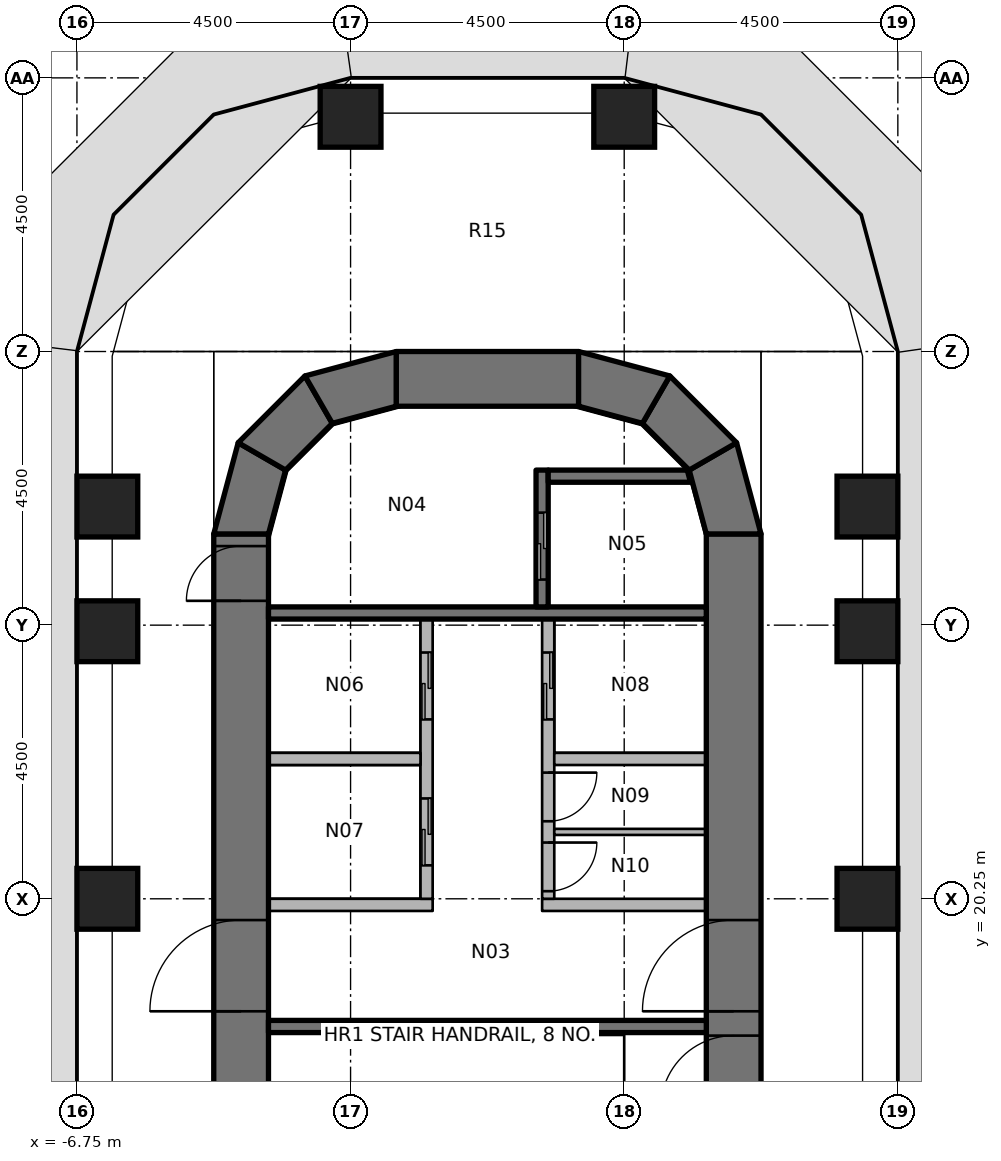
"""IFC4 building model, lengths in metres.
Left out: names, types, materials, properties, quantities, classifications, styles, units other than length and angle.
Written with IfcOpenShell. Run it as: python <this file> out.ifc"""

import sys

from ifc_helpers import new_model, si_unit, direction, frame, frame_2d, origin, origin_2d, place, context, subcontext, project, spatial, polyline, rectangle, outline, extrude, element, fill, save


model = new_model("IFC4")
c1 = context("Model", 3, precision=1e-05, world=origin(), true_north=direction((0.0, 1.0)))
c2 = subcontext(c1, "Body", "Model", "MODEL_VIEW")
j1 = project(units=[si_unit("LENGTHUNIT", "METRE"), si_unit("PLANEANGLEUNIT", "RADIAN")], contexts=[c1])
p1 = place(None, origin())
s1 = spatial("IfcSite", under=j1, at=p1, CompositionType="ELEMENT")
p2 = place(p1, origin())
s2 = spatial("IfcBuilding", under=s1, at=p2, CompositionType="ELEMENT")
p3 = place(p2, frame((0.0, 0.0, 43.8)))
s3 = spatial("IfcBuildingStorey", under=s2, at=p3, CompositionType="ELEMENT", Elevation=43.8)
for number, where, z_axis, x_axis in (
    (1, (-6.25, 20.25, 0.0), (0.0, 0.0, 1.0), (1.0, 0.0, 0.0)),
    (2, (-6.25, 24.65, 0.0), (0.0, 0.0, 1.0), (1.0, 0.0, 0.0)),
    (3, (-6.25, 26.7, 0.0), (0.0, 0.0, 1.0), (1.0, 0.0, 0.0)),
    (4, (-2.25, 33.11, 0.0), (0.0, 0.0, 1.0), (1.0, 0.0, 0.0)),
    (5, (2.25, 33.11, 0.0), (0.0, 0.0, 1.0), (1.0, 0.0, 0.0)),
    (6, (6.25, 20.25, 0.0), (0.0, 0.0, 1.0), (1.0, 0.0, 0.0)),
    (7, (6.25, 24.65, 0.0), (0.0, 0.0, 1.0), (1.0, 0.0, 0.0)),
    (8, (6.25, 26.7, 0.0), (0.0, 0.0, 1.0), (1.0, 0.0, 0.0)),
):
    element("IfcColumn", number, at=place(p3, frame(where, z_axis=z_axis, x_axis=x_axis)), inside=s3, PredefinedType="COLUMN", context=c2, shape_type="SweptSolid", body=[
        extrude(rectangle(XDim=1.0, YDim=1.0, at=origin_2d()), origin(), (0.0, 0.0, 1.0), 4.05),
    ])
p4 = place(p3, frame((-4.05, 11.25, 0.0), z_axis=(0.0, 0.0, 1.0), x_axis=(0.0, 1.0, 0.0)))
e9 = element("IfcWall", 9, at=p4, inside=s3, PredefinedType="SHEAR", context=c2, shape_type="SweptSolid", body=[
    extrude(rectangle(XDim=15.0, YDim=0.9, at=frame_2d((7.5, 0.0))), origin(), (0.0, 0.0, 1.0), 4.2),
])
p5 = place(p4, frame((7.15, 0.0, 0.0)))
e10 = element("IfcOpeningElement", 10, at=p5, cuts=e9, PredefinedType="OPENING", context=c2, shape_type="SweptSolid", body=[
    extrude(rectangle(XDim=1.5, YDim=2.3, at=frame_2d((0.75, 1.15))), frame((0.0, 0.46, 0.0), z_axis=(0.0, -1.0, 0.0), x_axis=(1.0, 0.0, 0.0)), (0.0, 0.0, 1.0), 0.92),
])
p6 = place(p4, frame((13.9, 0.0, 0.0)))
e11 = element("IfcOpeningElement", 11, at=p6, cuts=e9, PredefinedType="OPENING", context=c2, shape_type="SweptSolid", body=[
    extrude(rectangle(XDim=0.9, YDim=2.1, at=frame_2d((0.45, 1.05))), frame((0.0, 0.46, 0.0), z_axis=(0.0, -1.0, 0.0), x_axis=(1.0, 0.0, 0.0)), (0.0, 0.0, 1.0), 0.92),
])
p7 = place(p4, frame((1.15, 0.0, 0.0)))
e12 = element("IfcOpeningElement", 12, at=p7, cuts=e9, PredefinedType="OPENING", context=c2, shape_type="SweptSolid", body=[
    extrude(rectangle(XDim=1.2, YDim=2.1, at=frame_2d((0.6, 1.05))), frame((0.0, 0.46, 0.0), z_axis=(0.0, -1.0, 0.0), x_axis=(1.0, 0.0, 0.0)), (0.0, 0.0, 1.0), 0.92),
])
p8 = place(p3, frame((4.05, 11.25, 0.0), z_axis=(0.0, 0.0, 1.0), x_axis=(0.0, 1.0, 0.0)))
e13 = element("IfcWall", 13, at=p8, inside=s3, PredefinedType="SHEAR", context=c2, shape_type="SweptSolid", body=[
    extrude(rectangle(XDim=15.0, YDim=0.9, at=frame_2d((7.5, 0.0))), origin(), (0.0, 0.0, 1.0), 4.2),
])
p9 = place(p8, frame((7.15, 0.0, 0.0)))
e14 = element("IfcOpeningElement", 14, at=p9, cuts=e13, PredefinedType="OPENING", context=c2, shape_type="SweptSolid", body=[
    extrude(rectangle(XDim=1.5, YDim=2.3, at=frame_2d((0.75, 1.15))), frame((0.0, 0.46, 0.0), z_axis=(0.0, -1.0, 0.0), x_axis=(1.0, 0.0, 0.0)), (0.0, 0.0, 1.0), 0.92),
])
p10 = place(p8, frame((5.55, 0.0, 0.0)))
e15 = element("IfcOpeningElement", 15, at=p10, cuts=e13, PredefinedType="OPENING", context=c2, shape_type="SweptSolid", body=[
    extrude(rectangle(XDim=1.2, YDim=2.1, at=frame_2d((0.6, 1.05))), frame((0.0, 0.46, 0.0), z_axis=(0.0, -1.0, 0.0), x_axis=(1.0, 0.0, 0.0)), (0.0, 0.0, 1.0), 0.92),
])
p11 = place(p3, frame((-1.5, 28.8, 0.0), z_axis=(0.0, 0.0, 1.0), x_axis=(1.0, 0.0, 0.0)))
e16 = element("IfcWall", 16, at=p11, inside=s3, PredefinedType="SHEAR", context=c2, shape_type="SweptSolid", body=[
    extrude(rectangle(XDim=3.0, YDim=0.9, at=frame_2d((1.5, 0.0))), origin(), (0.0, 0.0, 1.0), 4.2),
])
p12 = place(p3, origin())
e17 = element("IfcWall", 17, at=p12, inside=s3, PredefinedType="SHEAR", context=c2, shape_type="SweptSolid", body=[
    extrude(outline(polyline([(-4.5, 26.25), (-4.098, 27.75), (-3.319, 27.3), (-3.6, 26.25), (-4.5, 26.25)])), origin(), (0.0, 0.0, 1.0), 4.2),
])
p13 = place(p3, origin())
e18 = element("IfcWall", 18, at=p13, inside=s3, PredefinedType="SHEAR", context=c2, shape_type="SweptSolid", body=[
    extrude(outline(polyline([(-4.098, 27.75), (-3.0, 28.848), (-2.55, 28.069), (-3.319, 27.3), (-4.098, 27.75)])), origin(), (0.0, 0.0, 1.0), 4.2),
])
p14 = place(p3, origin())
e19 = element("IfcWall", 19, at=p14, inside=s3, PredefinedType="SHEAR", context=c2, shape_type="SweptSolid", body=[
    extrude(outline(polyline([(-3.0, 28.848), (-1.5, 29.25), (-1.5, 28.35), (-2.55, 28.069), (-3.0, 28.848)])), origin(), (0.0, 0.0, 1.0), 4.2),
])
p15 = place(p3, origin())
e20 = element("IfcWall", 20, at=p15, inside=s3, PredefinedType="SHEAR", context=c2, shape_type="SweptSolid", body=[
    extrude(outline(polyline([(4.5, 26.25), (4.098, 27.75), (3.319, 27.3), (3.6, 26.25), (4.5, 26.25)])), origin(), (0.0, 0.0, 1.0), 4.2),
])
p16 = place(p3, origin())
e21 = element("IfcWall", 21, at=p16, inside=s3, PredefinedType="SHEAR", context=c2, shape_type="SweptSolid", body=[
    extrude(outline(polyline([(4.098, 27.75), (3.0, 28.848), (2.55, 28.069), (3.319, 27.3), (4.098, 27.75)])), origin(), (0.0, 0.0, 1.0), 4.2),
])
p17 = place(p3, origin())
e22 = element("IfcWall", 22, at=p17, inside=s3, PredefinedType="SHEAR", context=c2, shape_type="SweptSolid", body=[
    extrude(outline(polyline([(3.0, 28.848), (1.5, 29.25), (1.5, 28.35), (2.55, 28.069), (3.0, 28.848)])), origin(), (0.0, 0.0, 1.0), 4.2),
])
p18 = place(p3, frame((-3.6, 24.95, 0.0), z_axis=(0.0, 0.0, 1.0), x_axis=(1.0, 0.0, 0.0)))
e23 = element("IfcWall", 23, at=p18, inside=s3, PredefinedType="SHEAR", context=c2, shape_type="SweptSolid", body=[
    extrude(rectangle(XDim=7.2, YDim=0.2, at=frame_2d((3.6, 0.0))), origin(), (0.0, 0.0, 1.0), 4.05),
])
p19 = place(p3, frame((0.9, 27.3, 0.0), z_axis=(0.0, 0.0, 1.0), x_axis=(0.0, -1.0, 0.0)))
e24 = element("IfcWall", 24, at=p19, inside=s3, PredefinedType="SHEAR", context=c2, shape_type="SweptSolid", body=[
    extrude(rectangle(XDim=2.25, YDim=0.2, at=frame_2d((1.125, 0.0))), origin(), (0.0, 0.0, 1.0), 4.05),
])
p20 = place(p19, frame((0.7, 0.0, 0.0)))
e25 = element("IfcOpeningElement", 25, at=p20, cuts=e24, PredefinedType="OPENING", context=c2, shape_type="SweptSolid", body=[
    extrude(rectangle(XDim=1.1, YDim=2.3, at=frame_2d((0.55, 1.15))), frame((0.0, 0.11, 0.0), z_axis=(0.0, -1.0, 0.0), x_axis=(1.0, 0.0, 0.0)), (0.0, 0.0, 1.0), 0.22),
])
p21 = place(p3, origin())
e26 = element("IfcWall", 26, at=p21, inside=s3, PredefinedType="SHEAR", context=c2, shape_type="SweptSolid", body=[
    extrude(outline(polyline([(1.0, 27.1), (3.341, 27.1), (3.291, 27.284), (3.275, 27.3), (1.0, 27.3), (1.0, 27.1)])), origin(), (0.0, 0.0, 1.0), 4.05),
])
p22 = place(p3, frame((-3.6, 18.15, 0.0), z_axis=(0.0, 0.0, 1.0), x_axis=(1.0, 0.0, 0.0)))
e27 = element("IfcWall", 27, at=p22, inside=s3, PredefinedType="SHEAR", context=c2, shape_type="SweptSolid", body=[
    extrude(rectangle(XDim=7.2, YDim=0.2, at=frame_2d((3.6, 0.0))), origin(), (0.0, 0.0, 1.0), 4.05),
])
p23 = place(p3, frame((-3.6, 20.15, 0.0), z_axis=(0.0, 0.0, 1.0), x_axis=(1.0, 0.0, 0.0)))
e28 = element("IfcWall", 28, at=p23, inside=s3, PredefinedType="PARTITIONING", context=c2, shape_type="SweptSolid", body=[
    extrude(rectangle(XDim=2.7, YDim=0.2, at=frame_2d((1.35, 0.0))), origin(), (0.0, 0.0, 1.0), 4.05),
])
p24 = place(p3, frame((-1.0, 24.85, 0.0), z_axis=(0.0, 0.0, 1.0), x_axis=(0.0, -1.0, 0.0)))
e29 = element("IfcWall", 29, at=p24, inside=s3, PredefinedType="PARTITIONING", context=c2, shape_type="SweptSolid", body=[
    extrude(rectangle(XDim=4.6, YDim=0.2, at=frame_2d((2.3, 0.0))), origin(), (0.0, 0.0, 1.0), 4.05),
])
p25 = place(p24, frame((0.55, 0.0, 0.0)))
e30 = element("IfcOpeningElement", 30, at=p25, cuts=e29, PredefinedType="OPENING", context=c2, shape_type="SweptSolid", body=[
    extrude(rectangle(XDim=1.1, YDim=2.3, at=frame_2d((0.55, 1.15))), frame((0.0, 0.11, 0.0), z_axis=(0.0, -1.0, 0.0), x_axis=(1.0, 0.0, 0.0)), (0.0, 0.0, 1.0), 0.22),
])
p26 = place(p24, frame((2.95, 0.0, 0.0)))
e31 = element("IfcOpeningElement", 31, at=p26, cuts=e29, PredefinedType="OPENING", context=c2, shape_type="SweptSolid", body=[
    extrude(rectangle(XDim=1.1, YDim=2.3, at=frame_2d((0.55, 1.15))), frame((0.0, 0.11, 0.0), z_axis=(0.0, -1.0, 0.0), x_axis=(1.0, 0.0, 0.0)), (0.0, 0.0, 1.0), 0.22),
])
p27 = place(p3, frame((0.9, 20.15, 0.0), z_axis=(0.0, 0.0, 1.0), x_axis=(1.0, 0.0, 0.0)))
e32 = element("IfcWall", 32, at=p27, inside=s3, PredefinedType="PARTITIONING", context=c2, shape_type="SweptSolid", body=[
    extrude(rectangle(XDim=2.7, YDim=0.2, at=frame_2d((1.35, 0.0))), origin(), (0.0, 0.0, 1.0), 4.05),
])
p28 = place(p3, frame((1.0, 24.85, 0.0), z_axis=(0.0, 0.0, 1.0), x_axis=(0.0, -1.0, 0.0)))
e33 = element("IfcWall", 33, at=p28, inside=s3, PredefinedType="PARTITIONING", context=c2, shape_type="SweptSolid", body=[
    extrude(rectangle(XDim=4.6, YDim=0.2, at=frame_2d((2.3, 0.0))), origin(), (0.0, 0.0, 1.0), 4.05),
])
p29 = place(p28, frame((0.55, 0.0, 0.0)))
e34 = element("IfcOpeningElement", 34, at=p29, cuts=e33, PredefinedType="OPENING", context=c2, shape_type="SweptSolid", body=[
    extrude(rectangle(XDim=1.1, YDim=2.3, at=frame_2d((0.55, 1.15))), frame((0.0, 0.11, 0.0), z_axis=(0.0, -1.0, 0.0), x_axis=(1.0, 0.0, 0.0)), (0.0, 0.0, 1.0), 0.22),
])
p30 = place(p28, frame((2.525, 0.0, 0.0)))
e35 = element("IfcOpeningElement", 35, at=p30, cuts=e33, PredefinedType="OPENING", context=c2, shape_type="SweptSolid", body=[
    extrude(rectangle(XDim=0.8, YDim=2.1, at=frame_2d((0.4, 1.05))), frame((0.0, 0.11, 0.0), z_axis=(0.0, -1.0, 0.0), x_axis=(1.0, 0.0, 0.0)), (0.0, 0.0, 1.0), 0.22),
])
p31 = place(p28, frame((3.675, 0.0, 0.0)))
e36 = element("IfcOpeningElement", 36, at=p31, cuts=e33, PredefinedType="OPENING", context=c2, shape_type="SweptSolid", body=[
    extrude(rectangle(XDim=0.8, YDim=2.1, at=frame_2d((0.4, 1.05))), frame((0.0, 0.11, 0.0), z_axis=(0.0, -1.0, 0.0), x_axis=(1.0, 0.0, 0.0)), (0.0, 0.0, 1.0), 0.22),
])
for number, where, z_axis, x_axis in (
    (37, (-3.6, 22.55, 0.0), (0.0, 0.0, 1.0), (1.0, 0.0, 0.0)),
    (38, (1.1, 22.55, 0.0), (0.0, 0.0, 1.0), (1.0, 0.0, 0.0)),
):
    element("IfcWall", number, at=place(p3, frame(where, z_axis=z_axis, x_axis=x_axis)), inside=s3, PredefinedType="PARTITIONING", context=c2, shape_type="SweptSolid", body=[
        extrude(rectangle(XDim=2.5, YDim=0.2, at=frame_2d((1.25, 0.0))), origin(), (0.0, 0.0, 1.0), 4.05),
    ])
p32 = place(p3, frame((1.1, 21.35, 0.0), z_axis=(0.0, 0.0, 1.0), x_axis=(1.0, 0.0, 0.0)))
e39 = element("IfcWall", 39, at=p32, inside=s3, PredefinedType="PARTITIONING", context=c2, shape_type="SweptSolid", body=[
    extrude(rectangle(XDim=2.5, YDim=0.1, at=frame_2d((1.25, 0.0))), origin(), (0.0, 0.0, 1.0), 4.05),
])
p33 = place(p5, origin())
e40 = element("IfcDoor", 40, at=p33, inside=s3, OperationType="DOUBLE_DOOR_SINGLE_SWING", PredefinedType="DOOR", context=c2, shape_type="SweptSolid", body=[
    extrude(rectangle(XDim=1.5, YDim=2.3, at=frame_2d((0.75, 1.15))), frame((0.0, 0.025, 0.0), z_axis=(0.0, -1.0, 0.0), x_axis=(1.0, 0.0, 0.0)), (0.0, 0.0, 1.0), 0.05),
])
fill(e10, e40)
p34 = place(p9, origin())
e41 = element("IfcDoor", 41, at=p34, inside=s3, OperationType="DOUBLE_DOOR_SINGLE_SWING", PredefinedType="DOOR", context=c2, shape_type="SweptSolid", body=[
    extrude(rectangle(XDim=1.5, YDim=2.3, at=frame_2d((0.75, 1.15))), frame((0.0, 0.025, 0.0), z_axis=(0.0, -1.0, 0.0), x_axis=(1.0, 0.0, 0.0)), (0.0, 0.0, 1.0), 0.05),
])
fill(e14, e41)
p35 = place(p6, origin())
e42 = element("IfcDoor", 42, at=p35, inside=s3, OperationType="SINGLE_SWING_LEFT", PredefinedType="DOOR", context=c2, shape_type="SweptSolid", body=[
    extrude(rectangle(XDim=0.9, YDim=2.1, at=frame_2d((0.45, 1.05))), frame((0.0, 0.025, 0.0), z_axis=(0.0, -1.0, 0.0), x_axis=(1.0, 0.0, 0.0)), (0.0, 0.0, 1.0), 0.05),
])
fill(e11, e42)
p36 = place(p10, origin())
e43 = element("IfcDoor", 43, at=p36, inside=s3, OperationType="SINGLE_SWING_RIGHT", PredefinedType="DOOR", context=c2, shape_type="SweptSolid", body=[
    extrude(rectangle(XDim=1.2, YDim=2.1, at=frame_2d((0.6, 1.05))), frame((0.0, 0.025, 0.0), z_axis=(0.0, -1.0, 0.0), x_axis=(1.0, 0.0, 0.0)), (0.0, 0.0, 1.0), 0.05),
])
fill(e15, e43)
p37 = place(p20, origin())
e44 = element("IfcDoor", 44, at=p37, inside=s3, OperationType="DOUBLE_DOOR_SLIDING", PredefinedType="DOOR", context=c2, shape_type="SweptSolid", body=[
    extrude(rectangle(XDim=1.1, YDim=2.3, at=frame_2d((0.55, 1.15))), frame((0.0, 0.025, 0.0), z_axis=(0.0, -1.0, 0.0), x_axis=(1.0, 0.0, 0.0)), (0.0, 0.0, 1.0), 0.05),
])
fill(e25, e44)
p38 = place(p25, origin())
e45 = element("IfcDoor", 45, at=p38, inside=s3, OperationType="DOUBLE_DOOR_SLIDING", PredefinedType="DOOR", context=c2, shape_type="SweptSolid", body=[
    extrude(rectangle(XDim=1.1, YDim=2.3, at=frame_2d((0.55, 1.15))), frame((0.0, 0.025, 0.0), z_axis=(0.0, -1.0, 0.0), x_axis=(1.0, 0.0, 0.0)), (0.0, 0.0, 1.0), 0.05),
])
fill(e30, e45)
p39 = place(p26, origin())
e46 = element("IfcDoor", 46, at=p39, inside=s3, OperationType="DOUBLE_DOOR_SLIDING", PredefinedType="DOOR", context=c2, shape_type="SweptSolid", body=[
    extrude(rectangle(XDim=1.1, YDim=2.3, at=frame_2d((0.55, 1.15))), frame((0.0, 0.025, 0.0), z_axis=(0.0, -1.0, 0.0), x_axis=(1.0, 0.0, 0.0)), (0.0, 0.0, 1.0), 0.05),
])
fill(e31, e46)
p40 = place(p29, origin())
e47 = element("IfcDoor", 47, at=p40, inside=s3, OperationType="DOUBLE_DOOR_SLIDING", PredefinedType="DOOR", context=c2, shape_type="SweptSolid", body=[
    extrude(rectangle(XDim=1.1, YDim=2.3, at=frame_2d((0.55, 1.15))), frame((0.0, 0.025, 0.0), z_axis=(0.0, -1.0, 0.0), x_axis=(1.0, 0.0, 0.0)), (0.0, 0.0, 1.0), 0.05),
])
fill(e34, e47)
p41 = place(p30, origin())
e48 = element("IfcDoor", 48, at=p41, inside=s3, OperationType="SINGLE_SWING_RIGHT", PredefinedType="DOOR", context=c2, shape_type="SweptSolid", body=[
    extrude(rectangle(XDim=0.8, YDim=2.1, at=frame_2d((0.4, 1.05))), frame((0.0, 0.025, 0.0), z_axis=(0.0, -1.0, 0.0), x_axis=(1.0, 0.0, 0.0)), (0.0, 0.0, 1.0), 0.05),
])
fill(e35, e48)
p42 = place(p31, origin())
e49 = element("IfcDoor", 49, at=p42, inside=s3, OperationType="SINGLE_SWING_RIGHT", PredefinedType="DOOR", context=c2, shape_type="SweptSolid", body=[
    extrude(rectangle(XDim=0.8, YDim=2.1, at=frame_2d((0.4, 1.05))), frame((0.0, 0.025, 0.0), z_axis=(0.0, -1.0, 0.0), x_axis=(1.0, 0.0, 0.0)), (0.0, 0.0, 1.0), 0.05),
])
fill(e36, e49)
save(model, sys.argv[1])
